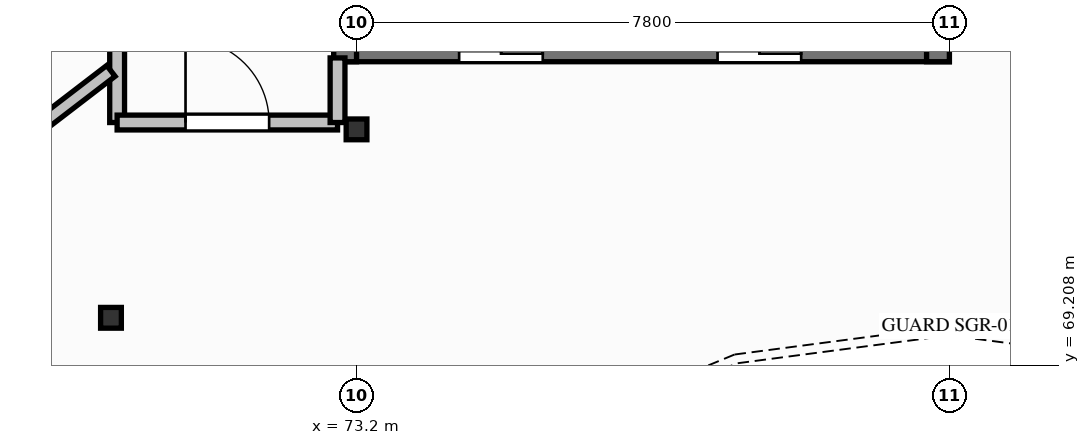
"""IFC4 building model, lengths in metres.
Left out: names, types, materials, properties, quantities, classifications, styles, units other than length and angle.
Written with IfcOpenShell. Run it as: python <this file> out.ifc"""

import sys

from ifc_helpers import new_model, si_unit, direction, frame, frame_2d, origin, origin_2d, place, context, subcontext, project, spatial, rectangle, hollow_circle, extrude, element, fill, save


model = new_model("IFC4")
c1 = context("Model", 3, precision=1e-05, world=origin(), true_north=direction((0.0, 1.0)))
c2 = subcontext(c1, "Body", "Model", "MODEL_VIEW")
j1 = project(units=[si_unit("LENGTHUNIT", "METRE"), si_unit("PLANEANGLEUNIT", "RADIAN")], contexts=[c1])
p1 = place(None, origin())
s1 = spatial("IfcSite", under=j1, at=p1, CompositionType="ELEMENT")
p2 = place(p1, origin())
s2 = spatial("IfcBuilding", under=s1, at=p2, CompositionType="ELEMENT")
p3 = place(p2, frame((0.0, 0.0, 4.5)))
s3 = spatial("IfcBuildingStorey", under=s2, at=p3, CompositionType="ELEMENT", Elevation=4.5)
p4 = place(p3, frame((72.9, 73.35, 0.0), z_axis=(0.0, 0.0, 1.0), x_axis=(1.0, 0.0, 0.0)))
e1 = element("IfcWall", 1, at=p4, inside=s3, PredefinedType="SHEAR", context=c2, shape_type="SweptSolid", body=[
    extrude(rectangle(XDim=8.1, YDim=0.3, at=frame_2d((4.05, 0.0))), origin(), (0.0, 0.0, 1.0), 4.5),
])
p5 = place(p4, frame((1.65, 0.0, 0.0)))
e2 = element("IfcOpeningElement", 2, at=p5, cuts=e1, PredefinedType="OPENING", context=c2, shape_type="SweptSolid", body=[
    extrude(rectangle(XDim=1.1, YDim=2.1, at=frame_2d((0.55, 1.05))), frame((0.0, 0.16, 0.0), z_axis=(0.0, -1.0, 0.0), x_axis=(1.0, 0.0, 0.0)), (0.0, 0.0, 1.0), 0.32),
])
p6 = place(p4, frame((5.05, 0.0, 0.0)))
e3 = element("IfcOpeningElement", 3, at=p6, cuts=e1, PredefinedType="OPENING", context=c2, shape_type="SweptSolid", body=[
    extrude(rectangle(XDim=1.1, YDim=2.1, at=frame_2d((0.55, 1.05))), frame((0.0, 0.16, 0.0), z_axis=(0.0, -1.0, 0.0), x_axis=(1.0, 0.0, 0.0)), (0.0, 0.0, 1.0), 0.32),
])
p7 = place(p3, frame((73.05, 73.2, 0.0), z_axis=(0.0, 0.0, 1.0), x_axis=(0.0, 1.0, 0.0)))
e4 = element("IfcWall", 4, at=p7, inside=s3, PredefinedType="SHEAR", context=c2, shape_type="SweptSolid", body=[
    extrude(rectangle(XDim=7.2, YDim=0.3, at=frame_2d((3.6, 0.0))), origin(), (0.0, 0.0, 1.0), 4.5),
])
p8 = place(p7, frame((4.2, 0.0, 0.0)))
e5 = element("IfcOpeningElement", 5, at=p8, cuts=e4, PredefinedType="OPENING", context=c2, shape_type="SweptSolid", body=[
    extrude(rectangle(XDim=1.1, YDim=2.15, at=frame_2d((0.55, 1.075))), frame((0.0, 0.16, 0.0), z_axis=(0.0, -1.0, 0.0), x_axis=(1.0, 0.0, 0.0)), (0.0, 0.0, 1.0), 0.32),
])
p9 = place(p3, frame((80.85, 73.2, 0.0), z_axis=(0.0, 0.0, 1.0), x_axis=(0.0, 1.0, 0.0)))
e6 = element("IfcWall", 6, at=p9, inside=s3, PredefinedType="SHEAR", context=c2, shape_type="SweptSolid", body=[
    extrude(rectangle(XDim=7.2, YDim=0.3, at=frame_2d((3.6, 0.0))), origin(), (0.0, 0.0, 1.0), 4.5),
])
for number, where, z_axis, x_axis in (
    (7, (73.2, 72.31, 0.0), (0.0, 0.0, 1.0), (1.0, 0.0, 0.0)),
    (8, (69.969, 69.831, 0.0), (0.0, 0.0, 1.0), (1.0, 0.0, 0.0)),
):
    element("IfcColumn", number, at=place(p3, frame(where, z_axis=z_axis, x_axis=x_axis)), inside=s3, PredefinedType="COLUMN", context=c2, shape_type="SweptSolid", body=[
        extrude(hollow_circle(Radius=0.136, WallThickness=0.012, at=origin_2d()), origin(), (0.0, 0.0, 1.0), 4.5),
    ])
p10 = place(p3, frame((70.05, 72.4, 0.0), z_axis=(0.0, 0.0, 1.0), x_axis=(0.0, 1.0, 0.0)))
e9 = element("IfcWall", 9, at=p10, inside=s3, PredefinedType="PARTITIONING", context=c2, shape_type="SweptSolid", body=[
    extrude(rectangle(XDim=7.95, YDim=0.195, at=frame_2d((3.975, 0.0))), origin(), (0.0, 0.0, 1.0), 3.838),
])
p11 = place(p3, frame((70.05, 72.4, 0.0), z_axis=(0.0, 0.0, 1.0), x_axis=(1.0, 0.0, 0.0)))
e10 = element("IfcWall", 10, at=p11, inside=s3, PredefinedType="PARTITIONING", context=c2, shape_type="SweptSolid", body=[
    extrude(rectangle(XDim=2.9, YDim=0.195, at=frame_2d((1.45, 0.0))), origin(), (0.0, 0.0, 1.0), 3.868),
])
p12 = place(p11, frame((0.9, 0.0, 0.0)))
e11 = element("IfcOpeningElement", 11, at=p12, cuts=e10, PredefinedType="OPENING", context=c2, shape_type="SweptSolid", body=[
    extrude(rectangle(XDim=1.1, YDim=2.15, at=frame_2d((0.55, 1.075))), frame((0.0, 0.107, 0.0), z_axis=(0.0, -1.0, 0.0), x_axis=(1.0, 0.0, 0.0)), (0.0, 0.0, 1.0), 0.215),
])
p13 = place(p3, frame((72.95, 72.4, 0.0), z_axis=(0.0, 0.0, 1.0), x_axis=(0.0, 1.0, 0.0)))
e12 = element("IfcWall", 12, at=p13, inside=s3, PredefinedType="PARTITIONING", context=c2, shape_type="SweptSolid", body=[
    extrude(rectangle(XDim=0.85, YDim=0.195, at=frame_2d((0.425, 0.0))), origin(), (0.0, 0.0, 1.0), 3.868),
])
p14 = place(p3, frame((69.969, 73.079, 0.0), z_axis=(0.0, 0.0, 1.0), x_axis=(-0.7933756116, -0.608732403374, 0.0)))
e13 = element("IfcWall", 13, at=p14, inside=s3, PredefinedType="PARTITIONING", context=c2, shape_type="SweptSolid", body=[
    extrude(rectangle(XDim=2.317, YDim=0.18, at=frame_2d((1.158, 0.0))), origin(), (0.0, 0.0, 1.0), 3.868),
])
p15 = place(p12, origin())
e14 = element("IfcDoor", 14, at=p15, inside=s3, OperationType="SINGLE_SWING_LEFT", PredefinedType="DOOR", context=c2, shape_type="SweptSolid", body=[
    extrude(rectangle(XDim=1.1, YDim=2.15, at=frame_2d((0.55, 1.075))), frame((0.0, 0.025, 0.0), z_axis=(0.0, -1.0, 0.0), x_axis=(1.0, 0.0, 0.0)), (0.0, 0.0, 1.0), 0.05),
])
fill(e11, e14)
save(model, sys.argv[1])
